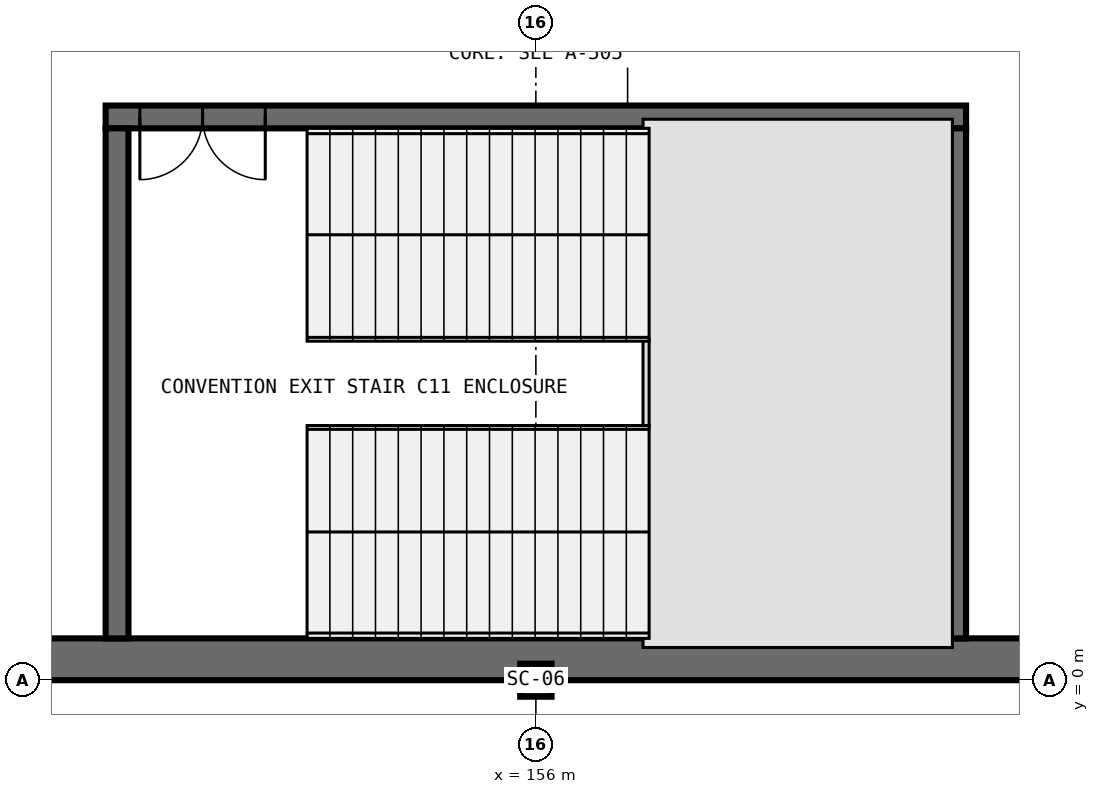
"""IFC4 building model, lengths in metres.
Left out: names, types, materials, properties, quantities, classifications, styles, units other than length and angle.
Written with IfcOpenShell. Run it as: python <this file> out.ifc"""

import sys

from ifc_helpers import new_model, si_unit, direction, frame, frame_2d, origin, origin_2d, place, context, subcontext, project, spatial, rectangle, i_section, extrude, element, fill, save


model = new_model("IFC4")
c1 = context("Model", 3, precision=1e-05, world=origin(), true_north=direction((0.0, 1.0)))
c2 = subcontext(c1, "Body", "Model", "MODEL_VIEW")
j1 = project(units=[si_unit("LENGTHUNIT", "METRE"), si_unit("PLANEANGLEUNIT", "RADIAN")], contexts=[c1])
p1 = place(None, origin())
s1 = spatial("IfcSite", under=j1, at=p1, CompositionType="ELEMENT")
p2 = place(p1, origin())
s2 = spatial("IfcBuilding", under=s1, at=p2, CompositionType="ELEMENT")
p3 = place(p2, frame((0.0, 0.0, -5.4)))
s3 = spatial("IfcBuildingStorey", under=s2, at=p3, CompositionType="ELEMENT", Elevation=-5.4)
p4 = place(p3, frame((156.0, 0.0, 0.0), z_axis=(0.0, 0.0, 1.0), x_axis=(1.0, 0.0, 0.0)))
e1 = element("IfcColumn", 1, at=p4, inside=s3, PredefinedType="COLUMN", context=c2, shape_type="SweptSolid", body=[
    extrude(i_section(OverallWidth=0.412, OverallDepth=0.435, WebThickness=0.036, FlangeThickness=0.057, FilletRadius=0.031, at=origin_2d()), origin(), (0.0, 0.0, 1.0), 5.4),
])
p5 = place(p3, frame((0.0, 0.275, 0.0), z_axis=(0.0, 0.0, 1.0), x_axis=(1.0, 0.0, 0.0)))
e2 = element("IfcWall", 2, at=p5, inside=s3, PredefinedType="SOLIDWALL", context=c2, shape_type="SweptSolid", body=[
    extrude(rectangle(XDim=174.0, YDim=0.55, at=frame_2d((87.0, 0.0))), origin(), (0.0, 0.0, 1.0), 5.02),
])
p6 = place(p3, frame((161.66, 7.41, 0.0), z_axis=(0.0, 0.0, 1.0), x_axis=(-1.0, 0.0, 0.0)))
e3 = element("IfcWall", 3, at=p6, inside=s3, PredefinedType="SHEAR", context=c2, shape_type="SweptSolid", body=[
    extrude(rectangle(XDim=11.32, YDim=0.3, at=frame_2d((5.66, 0.0))), origin(), (0.0, 0.0, 1.0), 5.4),
])
p7 = place(p6, frame((9.22, 0.0, 0.0)))
e4 = element("IfcOpeningElement", 4, at=p7, cuts=e3, PredefinedType="OPENING", context=c2, shape_type="SweptSolid", body=[
    extrude(rectangle(XDim=1.65, YDim=2.25, at=frame_2d((0.825, 1.125))), frame((0.0, 0.165, 0.0), z_axis=(0.0, -1.0, 0.0), x_axis=(1.0, 0.0, 0.0)), (0.0, 0.0, 1.0), 0.33),
])
for number, where, z_axis, x_axis in (
    (5, (150.49, 7.26, 0.0), (0.0, 0.0, 1.0), (0.0, -1.0, 0.0)),
    (6, (161.51, 0.55, 0.0), (0.0, 0.0, 1.0), (0.0, 1.0, 0.0)),
):
    element("IfcWall", number, at=place(p3, frame(where, z_axis=z_axis, x_axis=x_axis)), inside=s3, PredefinedType="SHEAR", context=c2, shape_type="SweptSolid", body=[
        extrude(rectangle(XDim=6.71, YDim=0.3, at=frame_2d((3.355, 0.0))), origin(), (0.0, 0.0, 1.0), 5.4),
    ])
p8 = place(p7, origin())
e7 = element("IfcDoor", 7, at=p8, inside=s3, OperationType="DOUBLE_DOOR_SINGLE_SWING", PredefinedType="DOOR", context=c2, shape_type="SweptSolid", body=[
    extrude(rectangle(XDim=1.65, YDim=2.25, at=frame_2d((0.825, 1.125))), frame((0.0, 0.025, 0.0), z_axis=(0.0, -1.0, 0.0), x_axis=(1.0, 0.0, 0.0)), (0.0, 0.0, 1.0), 0.05),
])
fill(e4, e7)
save(model, sys.argv[1])
